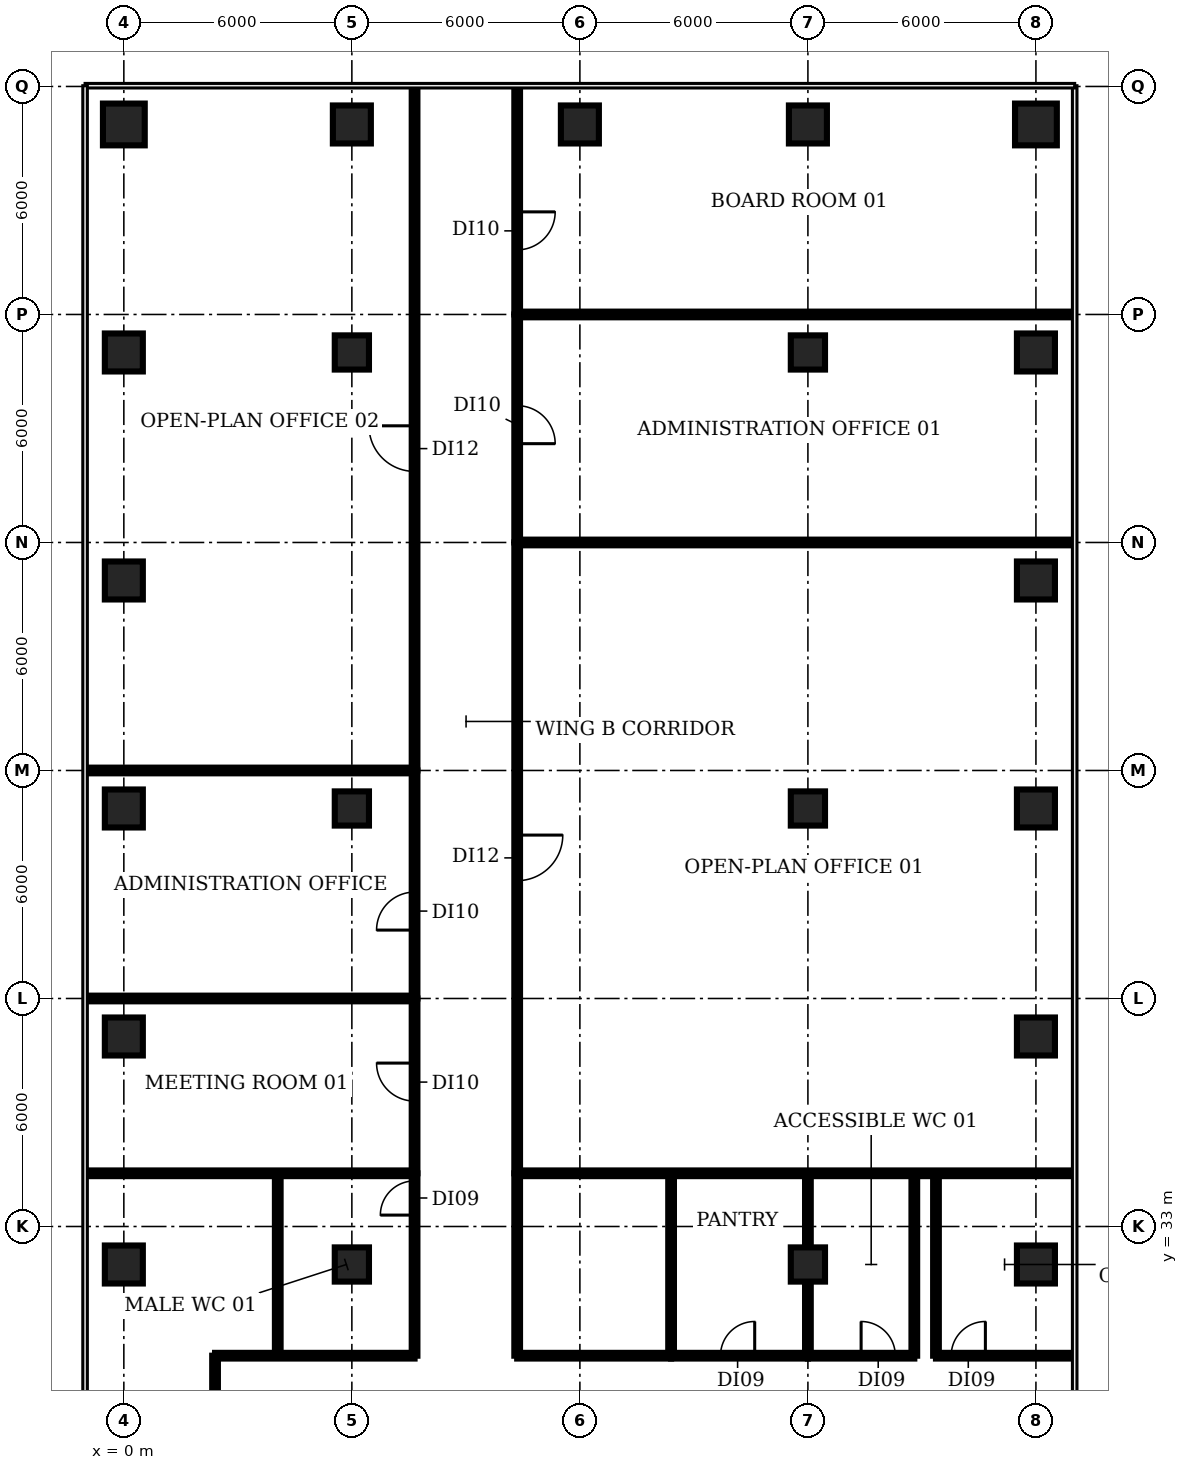
"""IFC4 building model, lengths in metres.
Left out: names, types, materials, properties, quantities, classifications, styles, units other than length and angle.
Written with IfcOpenShell. Run it as: python <this file> out.ifc"""

import sys

from ifc_helpers import new_model, si_unit, direction, frame, frame_2d, origin, origin_2d, place, context, subcontext, project, spatial, rectangle, circle, extrude, element, fill, save


model = new_model("IFC4")
c1 = context("Model", 3, precision=1e-05, world=origin(), true_north=direction((0.0, 1.0)))
c2 = subcontext(c1, "Body", "Model", "MODEL_VIEW")
j1 = project(units=[si_unit("LENGTHUNIT", "METRE"), si_unit("PLANEANGLEUNIT", "RADIAN")], contexts=[c1])
p1 = place(None, origin())
s1 = spatial("IfcSite", under=j1, at=p1, CompositionType="ELEMENT")
p2 = place(p1, origin())
s2 = spatial("IfcBuilding", under=s1, at=p2, CompositionType="ELEMENT")
p3 = place(p2, frame((0.0, 0.0, 24.5)))
s3 = spatial("IfcBuildingStorey", under=s2, at=p3, CompositionType="ELEMENT", Elevation=24.5)
for number, where, z_axis, x_axis in (
    (1, (0.0, 32.0, 0.0), (0.0, 0.0, 1.0), (1.0, 0.0, 0.0)),
    (2, (0.0, 38.0, 0.0), (0.0, 0.0, 1.0), (1.0, 0.0, 0.0)),
    (3, (0.0, 44.0, 0.0), (0.0, 0.0, 1.0), (1.0, 0.0, 0.0)),
    (4, (0.0, 50.0, 0.0), (0.0, 0.0, 1.0), (1.0, 0.0, 0.0)),
    (5, (0.0, 56.0, 0.0), (0.0, 0.0, 1.0), (1.0, 0.0, 0.0)),
):
    element("IfcColumn", number, at=place(p3, frame(where, z_axis=z_axis, x_axis=x_axis)), inside=s3, PredefinedType="COLUMN", context=c2, shape_type="SweptSolid", body=[
        extrude(rectangle(XDim=1.0, YDim=1.0, at=origin_2d()), origin(), (0.0, 0.0, 1.0), 4.15),
    ])
p4 = place(p3, frame((0.0, 62.0, 0.0), z_axis=(0.0, 0.0, 1.0), x_axis=(1.0, 0.0, 0.0)))
e6 = element("IfcColumn", 6, at=p4, inside=s3, PredefinedType="COLUMN", context=c2, shape_type="SweptSolid", body=[
    extrude(circle(Radius=0.55, at=origin_2d()), origin(), (0.0, 0.0, 1.0), 4.15),
])
for number, where, z_axis, x_axis in (
    (7, (6.0, 32.0, 0.0), (0.0, 0.0, 1.0), (1.0, 0.0, 0.0)),
    (8, (6.0, 44.0, 0.0), (0.0, 0.0, 1.0), (1.0, 0.0, 0.0)),
    (9, (6.0, 56.0, 0.0), (0.0, 0.0, 1.0), (1.0, 0.0, 0.0)),
):
    element("IfcColumn", number, at=place(p3, frame(where, z_axis=z_axis, x_axis=x_axis)), inside=s3, PredefinedType="COLUMN", context=c2, shape_type="SweptSolid", body=[
        extrude(rectangle(XDim=0.9, YDim=0.9, at=origin_2d()), origin(), (0.0, 0.0, 1.0), 4.15),
    ])
for number, where, z_axis, x_axis in (
    (10, (6.0, 62.0, 0.0), (0.0, 0.0, 1.0), (1.0, 0.0, 0.0)),
    (11, (12.0, 62.0, 0.0), (0.0, 0.0, 1.0), (1.0, 0.0, 0.0)),
):
    element("IfcColumn", number, at=place(p3, frame(where, z_axis=z_axis, x_axis=x_axis)), inside=s3, PredefinedType="COLUMN", context=c2, shape_type="SweptSolid", body=[
        extrude(rectangle(XDim=1.0, YDim=1.0, at=origin_2d()), origin(), (0.0, 0.0, 1.0), 4.15),
    ])
for number, where, z_axis, x_axis in (
    (12, (18.0, 32.0, 0.0), (0.0, 0.0, 1.0), (1.0, 0.0, 0.0)),
    (13, (18.0, 44.0, 0.0), (0.0, 0.0, 1.0), (1.0, 0.0, 0.0)),
    (14, (18.0, 56.0, 0.0), (0.0, 0.0, 1.0), (1.0, 0.0, 0.0)),
):
    element("IfcColumn", number, at=place(p3, frame(where, z_axis=z_axis, x_axis=x_axis)), inside=s3, PredefinedType="COLUMN", context=c2, shape_type="SweptSolid", body=[
        extrude(rectangle(XDim=0.9, YDim=0.9, at=origin_2d()), origin(), (0.0, 0.0, 1.0), 4.15),
    ])
for number, where, z_axis, x_axis in (
    (15, (18.0, 62.0, 0.0), (0.0, 0.0, 1.0), (1.0, 0.0, 0.0)),
    (16, (24.0, 32.0, 0.0), (0.0, 0.0, 1.0), (1.0, 0.0, 0.0)),
    (17, (24.0, 38.0, 0.0), (0.0, 0.0, 1.0), (1.0, 0.0, 0.0)),
    (18, (24.0, 44.0, 0.0), (0.0, 0.0, 1.0), (1.0, 0.0, 0.0)),
    (19, (24.0, 50.0, 0.0), (0.0, 0.0, 1.0), (1.0, 0.0, 0.0)),
    (20, (24.0, 56.0, 0.0), (0.0, 0.0, 1.0), (1.0, 0.0, 0.0)),
):
    element("IfcColumn", number, at=place(p3, frame(where, z_axis=z_axis, x_axis=x_axis)), inside=s3, PredefinedType="COLUMN", context=c2, shape_type="SweptSolid", body=[
        extrude(rectangle(XDim=1.0, YDim=1.0, at=origin_2d()), origin(), (0.0, 0.0, 1.0), 4.15),
    ])
p5 = place(p3, frame((24.0, 62.0, 0.0), z_axis=(0.0, 0.0, 1.0), x_axis=(1.0, 0.0, 0.0)))
e21 = element("IfcColumn", 21, at=p5, inside=s3, PredefinedType="COLUMN", context=c2, shape_type="SweptSolid", body=[
    extrude(circle(Radius=0.55, at=origin_2d()), origin(), (0.0, 0.0, 1.0), 4.15),
])
for number, where, z_axis, x_axis in (
    (22, (-0.97, 34.4, 0.0), (0.0, 0.0, 1.0), (1.0, 0.0, 0.0)),
    (23, (-0.97, 39.0, 0.0), (0.0, 0.0, 1.0), (1.0, 0.0, 0.0)),
    (24, (-0.97, 45.0, 0.0), (0.0, 0.0, 1.0), (1.0, 0.0, 0.0)),
):
    element("IfcWall", number, at=place(p3, frame(where, z_axis=z_axis, x_axis=x_axis)), inside=s3, PredefinedType="PARTITIONING", context=c2, shape_type="SweptSolid", body=[
        extrude(rectangle(XDim=8.62, YDim=0.15, at=frame_2d((4.31, 0.0))), origin(), (0.0, 0.0, 1.0), 3.08),
    ])
p6 = place(p3, frame((2.4, 25.7, 0.0), z_axis=(0.0, 0.0, 1.0), x_axis=(0.0, 1.0, 0.0)))
e25 = element("IfcWall", 25, at=p6, inside=s3, PredefinedType="PARTITIONING", context=c2, shape_type="SweptSolid", body=[
    extrude(rectangle(XDim=3.9, YDim=0.15, at=frame_2d((1.95, 0.0))), origin(), (0.0, 0.0, 1.0), 3.08),
])
p7 = place(p3, frame((2.4, 29.6, 0.0), z_axis=(0.0, 0.0, 1.0), x_axis=(1.0, 0.0, 0.0)))
e26 = element("IfcWall", 26, at=p7, inside=s3, PredefinedType="PARTITIONING", context=c2, shape_type="SweptSolid", body=[
    extrude(rectangle(XDim=5.25, YDim=0.15, at=frame_2d((2.625, 0.0))), origin(), (0.0, 0.0, 1.0), 3.08),
])
p8 = place(p3, frame((4.05, 29.6, 0.0), z_axis=(0.0, 0.0, 1.0), x_axis=(0.0, 1.0, 0.0)))
e27 = element("IfcWall", 27, at=p8, inside=s3, PredefinedType="PARTITIONING", context=c2, shape_type="SweptSolid", body=[
    extrude(rectangle(XDim=4.8, YDim=0.15, at=frame_2d((2.4, 0.0))), origin(), (0.0, 0.0, 1.0), 3.08),
])
p9 = place(p3, frame((7.65, 29.6, 0.0), z_axis=(0.0, 0.0, 1.0), x_axis=(0.0, 1.0, 0.0)))
e28 = element("IfcWall", 28, at=p9, inside=s3, PredefinedType="PARTITIONING", context=c2, shape_type="SweptSolid", body=[
    extrude(rectangle(XDim=4.8, YDim=0.15, at=frame_2d((2.4, 0.0))), origin(), (0.0, 0.0, 1.0), 3.08),
])
p10 = place(p9, frame((3.7, 0.0, 0.0)))
e29 = element("IfcOpeningElement", 29, at=p10, cuts=e28, PredefinedType="OPENING", context=c2, shape_type="SweptSolid", body=[
    extrude(rectangle(XDim=0.9, YDim=2.1, at=frame_2d((0.45, 1.05))), frame((0.0, 0.085, 0.0), z_axis=(0.0, -1.0, 0.0), x_axis=(1.0, 0.0, 0.0)), (0.0, 0.0, 1.0), 0.17),
])
p11 = place(p3, frame((7.65, 34.4, 0.0), z_axis=(0.0, 0.0, 1.0), x_axis=(0.0, 1.0, 0.0)))
e30 = element("IfcWall", 30, at=p11, inside=s3, PredefinedType="PARTITIONING", context=c2, shape_type="SweptSolid", body=[
    extrude(rectangle(XDim=4.6, YDim=0.15, at=frame_2d((2.3, 0.0))), origin(), (0.0, 0.0, 1.0), 3.08),
])
p12 = place(p11, frame((1.9, 0.0, 0.0)))
e31 = element("IfcOpeningElement", 31, at=p12, cuts=e30, PredefinedType="OPENING", context=c2, shape_type="SweptSolid", body=[
    extrude(rectangle(XDim=1.0, YDim=2.1, at=frame_2d((0.5, 1.05))), frame((0.0, 0.085, 0.0), z_axis=(0.0, -1.0, 0.0), x_axis=(1.0, 0.0, 0.0)), (0.0, 0.0, 1.0), 0.17),
])
p13 = place(p3, frame((7.65, 39.0, 0.0), z_axis=(0.0, 0.0, 1.0), x_axis=(0.0, 1.0, 0.0)))
e32 = element("IfcWall", 32, at=p13, inside=s3, PredefinedType="PARTITIONING", context=c2, shape_type="SweptSolid", body=[
    extrude(rectangle(XDim=6.0, YDim=0.15, at=frame_2d((3.0, 0.0))), origin(), (0.0, 0.0, 1.0), 3.08),
])
p14 = place(p13, frame((1.8, 0.0, 0.0)))
e33 = element("IfcOpeningElement", 33, at=p14, cuts=e32, PredefinedType="OPENING", context=c2, shape_type="SweptSolid", body=[
    extrude(rectangle(XDim=1.0, YDim=2.1, at=frame_2d((0.5, 1.05))), frame((0.0, 0.085, 0.0), z_axis=(0.0, -1.0, 0.0), x_axis=(1.0, 0.0, 0.0)), (0.0, 0.0, 1.0), 0.17),
])
p15 = place(p3, frame((7.65, 45.0, 0.0), z_axis=(0.0, 0.0, 1.0), x_axis=(0.0, 1.0, 0.0)))
e34 = element("IfcWall", 34, at=p15, inside=s3, PredefinedType="PARTITIONING", context=c2, shape_type="SweptSolid", body=[
    extrude(rectangle(XDim=17.97, YDim=0.15, at=frame_2d((8.985, 0.0))), origin(), (0.0, 0.0, 1.0), 3.08),
])
p16 = place(p15, frame((7.87, 0.0, 0.0)))
e35 = element("IfcOpeningElement", 35, at=p16, cuts=e34, PredefinedType="OPENING", context=c2, shape_type="SweptSolid", body=[
    extrude(rectangle(XDim=1.2, YDim=2.1, at=frame_2d((0.6, 1.05))), frame((0.0, 0.085, 0.0), z_axis=(0.0, -1.0, 0.0), x_axis=(1.0, 0.0, 0.0)), (0.0, 0.0, 1.0), 0.17),
])
p17 = place(p3, frame((10.35, 29.6, 0.0), z_axis=(0.0, 0.0, 1.0), x_axis=(0.0, 1.0, 0.0)))
e36 = element("IfcWall", 36, at=p17, inside=s3, PredefinedType="PARTITIONING", context=c2, shape_type="SweptSolid", body=[
    extrude(rectangle(XDim=4.8, YDim=0.15, at=frame_2d((2.4, 0.0))), origin(), (0.0, 0.0, 1.0), 3.08),
])
p18 = place(p3, frame((10.35, 29.6, 0.0), z_axis=(0.0, 0.0, 1.0), x_axis=(1.0, 0.0, 0.0)))
e37 = element("IfcWall", 37, at=p18, inside=s3, PredefinedType="PARTITIONING", context=c2, shape_type="SweptSolid", body=[
    extrude(rectangle(XDim=4.05, YDim=0.15, at=frame_2d((2.025, 0.0))), origin(), (0.0, 0.0, 1.0), 3.08),
])
p19 = place(p3, frame((10.35, 34.4, 0.0), z_axis=(0.0, 0.0, 1.0), x_axis=(1.0, 0.0, 0.0)))
e38 = element("IfcWall", 38, at=p19, inside=s3, PredefinedType="PARTITIONING", context=c2, shape_type="SweptSolid", body=[
    extrude(rectangle(XDim=14.62, YDim=0.15, at=frame_2d((7.31, 0.0))), origin(), (0.0, 0.0, 1.0), 3.08),
])
p20 = place(p3, frame((10.35, 51.0, 0.0), z_axis=(0.0, 0.0, 1.0), x_axis=(0.0, -1.0, 0.0)))
e39 = element("IfcWall", 39, at=p20, inside=s3, PredefinedType="PARTITIONING", context=c2, shape_type="SweptSolid", body=[
    extrude(rectangle(XDim=16.6, YDim=0.15, at=frame_2d((8.3, 0.0))), origin(), (0.0, 0.0, 1.0), 3.08),
])
p21 = place(p20, frame((7.7, 0.0, 0.0)))
e40 = element("IfcOpeningElement", 40, at=p21, cuts=e39, PredefinedType="OPENING", context=c2, shape_type="SweptSolid", body=[
    extrude(rectangle(XDim=1.2, YDim=2.1, at=frame_2d((0.6, 1.05))), frame((0.0, 0.085, 0.0), z_axis=(0.0, -1.0, 0.0), x_axis=(1.0, 0.0, 0.0)), (0.0, 0.0, 1.0), 0.17),
])
p22 = place(p3, frame((10.35, 51.0, 0.0), z_axis=(0.0, 0.0, 1.0), x_axis=(1.0, 0.0, 0.0)))
e41 = element("IfcWall", 41, at=p22, inside=s3, PredefinedType="PARTITIONING", context=c2, shape_type="SweptSolid", body=[
    extrude(rectangle(XDim=14.62, YDim=0.15, at=frame_2d((7.31, 0.0))), origin(), (0.0, 0.0, 1.0), 3.08),
])
p23 = place(p3, frame((10.35, 57.0, 0.0), z_axis=(0.0, 0.0, 1.0), x_axis=(0.0, -1.0, 0.0)))
e42 = element("IfcWall", 42, at=p23, inside=s3, PredefinedType="PARTITIONING", context=c2, shape_type="SweptSolid", body=[
    extrude(rectangle(XDim=6.0, YDim=0.15, at=frame_2d((3.0, 0.0))), origin(), (0.0, 0.0, 1.0), 3.08),
])
p24 = place(p23, frame((2.4, 0.0, 0.0)))
e43 = element("IfcOpeningElement", 43, at=p24, cuts=e42, PredefinedType="OPENING", context=c2, shape_type="SweptSolid", body=[
    extrude(rectangle(XDim=1.0, YDim=2.1, at=frame_2d((0.5, 1.05))), frame((0.0, 0.085, 0.0), z_axis=(0.0, -1.0, 0.0), x_axis=(1.0, 0.0, 0.0)), (0.0, 0.0, 1.0), 0.17),
])
p25 = place(p3, frame((10.35, 57.0, 0.0), z_axis=(0.0, 0.0, 1.0), x_axis=(1.0, 0.0, 0.0)))
e44 = element("IfcWall", 44, at=p25, inside=s3, PredefinedType="PARTITIONING", context=c2, shape_type="SweptSolid", body=[
    extrude(rectangle(XDim=14.605, YDim=0.15, at=frame_2d((7.302, 0.0))), origin(), (0.0, 0.0, 1.0), 3.08),
])
p26 = place(p3, frame((10.35, 62.97, 0.0), z_axis=(0.0, 0.0, 1.0), x_axis=(0.0, -1.0, 0.0)))
e45 = element("IfcWall", 45, at=p26, inside=s3, PredefinedType="PARTITIONING", context=c2, shape_type="SweptSolid", body=[
    extrude(rectangle(XDim=5.97, YDim=0.15, at=frame_2d((2.985, 0.0))), origin(), (0.0, 0.0, 1.0), 3.08),
])
p27 = place(p26, frame((3.27, 0.0, 0.0)))
e46 = element("IfcOpeningElement", 46, at=p27, cuts=e45, PredefinedType="OPENING", context=c2, shape_type="SweptSolid", body=[
    extrude(rectangle(XDim=1.0, YDim=2.1, at=frame_2d((0.5, 1.05))), frame((0.0, 0.085, 0.0), z_axis=(0.0, -1.0, 0.0), x_axis=(1.0, 0.0, 0.0)), (0.0, 0.0, 1.0), 0.17),
])
p28 = place(p3, frame((14.4, 29.6, 0.0), z_axis=(0.0, 0.0, 1.0), x_axis=(0.0, 1.0, 0.0)))
e47 = element("IfcWall", 47, at=p28, inside=s3, PredefinedType="PARTITIONING", context=c2, shape_type="SweptSolid", body=[
    extrude(rectangle(XDim=4.8, YDim=0.15, at=frame_2d((2.4, 0.0))), origin(), (0.0, 0.0, 1.0), 3.08),
])
p29 = place(p3, frame((14.4, 29.6, 0.0), z_axis=(0.0, 0.0, 1.0), x_axis=(1.0, 0.0, 0.0)))
e48 = element("IfcWall", 48, at=p29, inside=s3, PredefinedType="PARTITIONING", context=c2, shape_type="SweptSolid", body=[
    extrude(rectangle(XDim=3.6, YDim=0.15, at=frame_2d((1.8, 0.0))), origin(), (0.0, 0.0, 1.0), 3.08),
])
p30 = place(p29, frame((1.3, 0.0, 0.0)))
e49 = element("IfcOpeningElement", 49, at=p30, cuts=e48, PredefinedType="OPENING", context=c2, shape_type="SweptSolid", body=[
    extrude(rectangle(XDim=0.9, YDim=2.1, at=frame_2d((0.45, 1.05))), frame((0.0, 0.085, 0.0), z_axis=(0.0, -1.0, 0.0), x_axis=(1.0, 0.0, 0.0)), (0.0, 0.0, 1.0), 0.17),
])
p31 = place(p3, frame((18.0, 29.6, 0.0), z_axis=(0.0, 0.0, 1.0), x_axis=(0.0, 1.0, 0.0)))
e50 = element("IfcWall", 50, at=p31, inside=s3, PredefinedType="PARTITIONING", context=c2, shape_type="SweptSolid", body=[
    extrude(rectangle(XDim=4.8, YDim=0.15, at=frame_2d((2.4, 0.0))), origin(), (0.0, 0.0, 1.0), 3.08),
])
p32 = place(p3, frame((18.0, 29.6, 0.0), z_axis=(0.0, 0.0, 1.0), x_axis=(1.0, 0.0, 0.0)))
e51 = element("IfcWall", 51, at=p32, inside=s3, PredefinedType="PARTITIONING", context=c2, shape_type="SweptSolid", body=[
    extrude(rectangle(XDim=2.8, YDim=0.15, at=frame_2d((1.4, 0.0))), origin(), (0.0, 0.0, 1.0), 3.08),
])
p33 = place(p32, frame((1.4, 0.0, 0.0)))
e52 = element("IfcOpeningElement", 52, at=p33, cuts=e51, PredefinedType="OPENING", context=c2, shape_type="SweptSolid", body=[
    extrude(rectangle(XDim=0.9, YDim=2.1, at=frame_2d((0.45, 1.05))), frame((0.0, 0.085, 0.0), z_axis=(0.0, -1.0, 0.0), x_axis=(1.0, 0.0, 0.0)), (0.0, 0.0, 1.0), 0.17),
])
for number, where, z_axis, x_axis in (
    (53, (20.8, 29.6, 0.0), (0.0, 0.0, 1.0), (0.0, 1.0, 0.0)),
    (54, (21.37, 29.6, 0.0), (0.0, 0.0, 1.0), (0.0, 1.0, 0.0)),
):
    element("IfcWall", number, at=place(p3, frame(where, z_axis=z_axis, x_axis=x_axis)), inside=s3, PredefinedType="PARTITIONING", context=c2, shape_type="SweptSolid", body=[
        extrude(rectangle(XDim=4.8, YDim=0.15, at=frame_2d((2.4, 0.0))), origin(), (0.0, 0.0, 1.0), 3.08),
    ])
p34 = place(p3, frame((21.37, 29.6, 0.0), z_axis=(0.0, 0.0, 1.0), x_axis=(1.0, 0.0, 0.0)))
e55 = element("IfcWall", 55, at=p34, inside=s3, PredefinedType="PARTITIONING", context=c2, shape_type="SweptSolid", body=[
    extrude(rectangle(XDim=3.6, YDim=0.15, at=frame_2d((1.8, 0.0))), origin(), (0.0, 0.0, 1.0), 3.08),
])
p35 = place(p34, frame((0.4, 0.0, 0.0)))
e56 = element("IfcOpeningElement", 56, at=p35, cuts=e55, PredefinedType="OPENING", context=c2, shape_type="SweptSolid", body=[
    extrude(rectangle(XDim=0.9, YDim=2.1, at=frame_2d((0.45, 1.05))), frame((0.0, 0.085, 0.0), z_axis=(0.0, -1.0, 0.0), x_axis=(1.0, 0.0, 0.0)), (0.0, 0.0, 1.0), 0.17),
])
p36 = place(p10, origin())
e57 = element("IfcDoor", 57, at=p36, inside=s3, OperationType="SINGLE_SWING_LEFT", PredefinedType="DOOR", context=c2, shape_type="SweptSolid", body=[
    extrude(rectangle(XDim=0.9, YDim=2.1, at=frame_2d((0.45, 1.05))), frame((0.0, 0.025, 0.0), z_axis=(0.0, -1.0, 0.0), x_axis=(1.0, 0.0, 0.0)), (0.0, 0.0, 1.0), 0.05),
])
fill(e29, e57)
p37 = place(p12, origin())
e58 = element("IfcDoor", 58, at=p37, inside=s3, OperationType="SINGLE_SWING_RIGHT", PredefinedType="DOOR", context=c2, shape_type="SweptSolid", body=[
    extrude(rectangle(XDim=1.0, YDim=2.1, at=frame_2d((0.5, 1.05))), frame((0.0, 0.025, 0.0), z_axis=(0.0, -1.0, 0.0), x_axis=(1.0, 0.0, 0.0)), (0.0, 0.0, 1.0), 0.05),
])
fill(e31, e58)
p38 = place(p14, origin())
e59 = element("IfcDoor", 59, at=p38, inside=s3, OperationType="SINGLE_SWING_LEFT", PredefinedType="DOOR", context=c2, shape_type="SweptSolid", body=[
    extrude(rectangle(XDim=1.0, YDim=2.1, at=frame_2d((0.5, 1.05))), frame((0.0, 0.025, 0.0), z_axis=(0.0, -1.0, 0.0), x_axis=(1.0, 0.0, 0.0)), (0.0, 0.0, 1.0), 0.05),
])
fill(e33, e59)
p39 = place(p16, origin())
e60 = element("IfcDoor", 60, at=p39, inside=s3, OperationType="SINGLE_SWING_RIGHT", PredefinedType="DOOR", context=c2, shape_type="SweptSolid", body=[
    extrude(rectangle(XDim=1.2, YDim=2.1, at=frame_2d((0.6, 1.05))), frame((0.0, 0.025, 0.0), z_axis=(0.0, -1.0, 0.0), x_axis=(1.0, 0.0, 0.0)), (0.0, 0.0, 1.0), 0.05),
])
fill(e35, e60)
p40 = place(p21, origin())
e61 = element("IfcDoor", 61, at=p40, inside=s3, OperationType="SINGLE_SWING_LEFT", PredefinedType="DOOR", context=c2, shape_type="SweptSolid", body=[
    extrude(rectangle(XDim=1.2, YDim=2.1, at=frame_2d((0.6, 1.05))), frame((0.0, 0.025, 0.0), z_axis=(0.0, -1.0, 0.0), x_axis=(1.0, 0.0, 0.0)), (0.0, 0.0, 1.0), 0.05),
])
fill(e40, e61)
p41 = place(p24, origin())
e62 = element("IfcDoor", 62, at=p41, inside=s3, OperationType="SINGLE_SWING_RIGHT", PredefinedType="DOOR", context=c2, shape_type="SweptSolid", body=[
    extrude(rectangle(XDim=1.0, YDim=2.1, at=frame_2d((0.5, 1.05))), frame((0.0, 0.025, 0.0), z_axis=(0.0, -1.0, 0.0), x_axis=(1.0, 0.0, 0.0)), (0.0, 0.0, 1.0), 0.05),
])
fill(e43, e62)
p42 = place(p27, origin())
e63 = element("IfcDoor", 63, at=p42, inside=s3, OperationType="SINGLE_SWING_LEFT", PredefinedType="DOOR", context=c2, shape_type="SweptSolid", body=[
    extrude(rectangle(XDim=1.0, YDim=2.1, at=frame_2d((0.5, 1.05))), frame((0.0, 0.025, 0.0), z_axis=(0.0, -1.0, 0.0), x_axis=(1.0, 0.0, 0.0)), (0.0, 0.0, 1.0), 0.05),
])
fill(e46, e63)
p43 = place(p30, origin())
e64 = element("IfcDoor", 64, at=p43, inside=s3, OperationType="SINGLE_SWING_RIGHT", PredefinedType="DOOR", context=c2, shape_type="SweptSolid", body=[
    extrude(rectangle(XDim=0.9, YDim=2.1, at=frame_2d((0.45, 1.05))), frame((0.0, 0.025, 0.0), z_axis=(0.0, -1.0, 0.0), x_axis=(1.0, 0.0, 0.0)), (0.0, 0.0, 1.0), 0.05),
])
fill(e49, e64)
p44 = place(p33, origin())
e65 = element("IfcDoor", 65, at=p44, inside=s3, OperationType="SINGLE_SWING_LEFT", PredefinedType="DOOR", context=c2, shape_type="SweptSolid", body=[
    extrude(rectangle(XDim=0.9, YDim=2.1, at=frame_2d((0.45, 1.05))), frame((0.0, 0.025, 0.0), z_axis=(0.0, -1.0, 0.0), x_axis=(1.0, 0.0, 0.0)), (0.0, 0.0, 1.0), 0.05),
])
fill(e52, e65)
p45 = place(p35, origin())
e66 = element("IfcDoor", 66, at=p45, inside=s3, OperationType="SINGLE_SWING_RIGHT", PredefinedType="DOOR", context=c2, shape_type="SweptSolid", body=[
    extrude(rectangle(XDim=0.9, YDim=2.1, at=frame_2d((0.45, 1.05))), frame((0.0, 0.025, 0.0), z_axis=(0.0, -1.0, 0.0), x_axis=(1.0, 0.0, 0.0)), (0.0, 0.0, 1.0), 0.05),
])
fill(e56, e66)
save(model, sys.argv[1])
